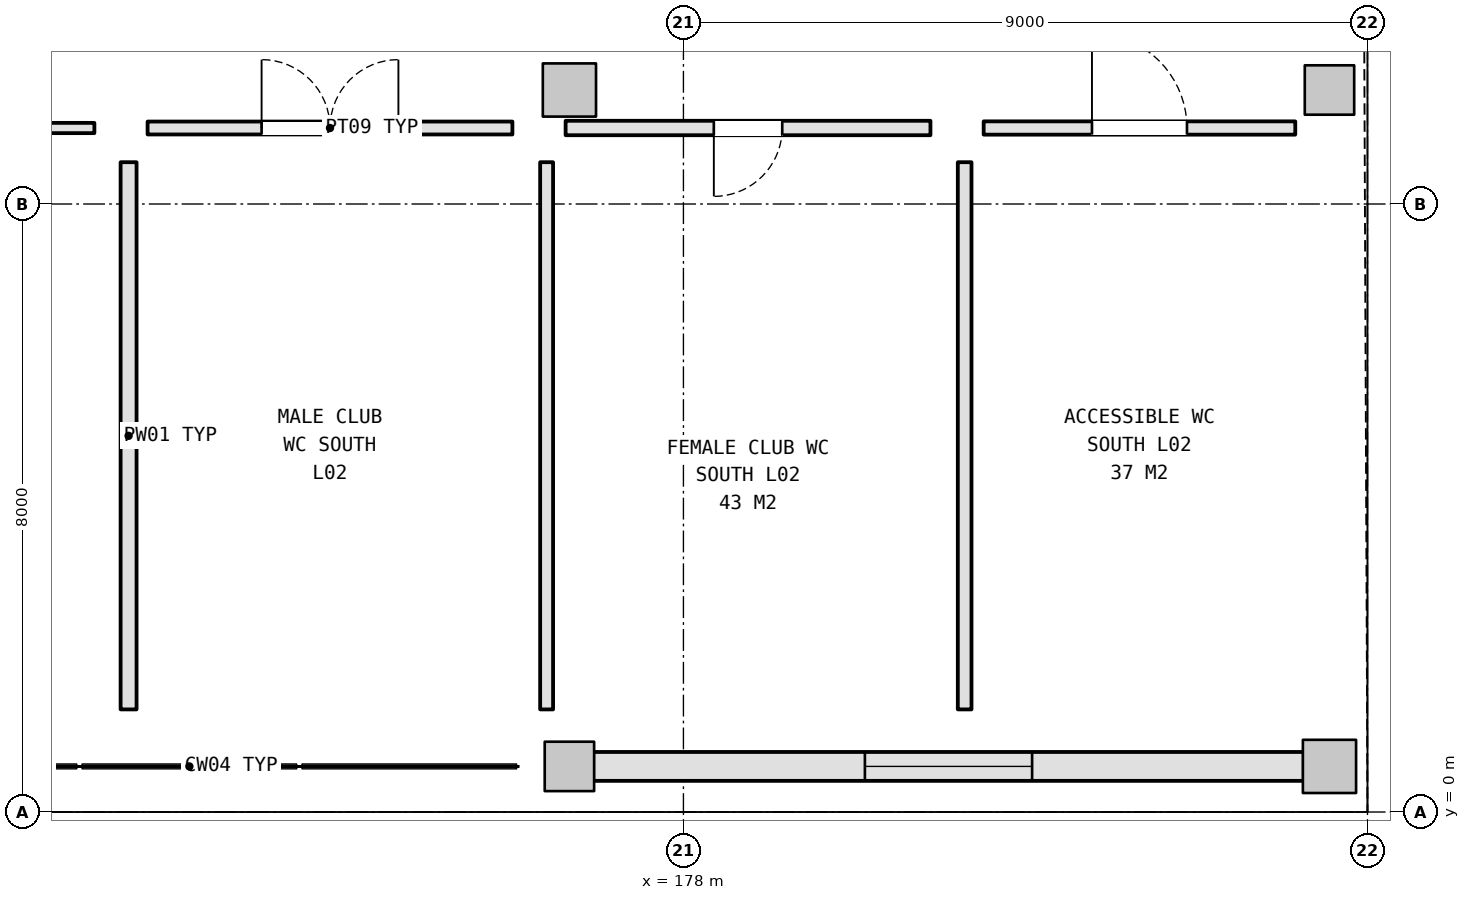
"""IFC4 building model, lengths in metres.
Left out: names, types, materials, properties, quantities, classifications, styles, units other than length and angle.
Written with IfcOpenShell. Run it as: python <this file> out.ifc"""

import sys

from ifc_helpers import new_model, si_unit, direction, frame, frame_2d, origin, origin_2d, place, context, subcontext, project, spatial, rectangle, extrude, element, fill, save


model = new_model("IFC4")
c1 = context("Model", 3, precision=1e-05, world=origin(), true_north=direction((0.0, 1.0)))
c2 = subcontext(c1, "Body", "Model", "MODEL_VIEW")
j1 = project(units=[si_unit("LENGTHUNIT", "METRE"), si_unit("PLANEANGLEUNIT", "RADIAN")], contexts=[c1])
p1 = place(None, origin())
s1 = spatial("IfcSite", under=j1, at=p1, CompositionType="ELEMENT")
p2 = place(p1, origin())
s2 = spatial("IfcBuilding", under=s1, at=p2, CompositionType="ELEMENT")
p3 = place(p2, frame((0.0, 0.0, 10.8)))
s3 = spatial("IfcBuildingStorey", under=s2, at=p3, CompositionType="ELEMENT", Elevation=10.8)
p4 = place(p3, frame((176.5, 0.6, 0.0), z_axis=(0.0, 0.0, 1.0), x_axis=(1.0, 0.0, 0.0)))
e1 = element("IfcColumn", 1, at=p4, inside=s3, PredefinedType="COLUMN", context=c2, shape_type="SweptSolid", body=[
    extrude(rectangle(XDim=0.65, YDim=0.65, at=origin_2d()), origin(), (0.0, 0.0, 1.0), 5.4),
])
for number, where, z_axis, x_axis in (
    (2, (176.5, 9.5, 0.0), (0.0, 0.0, 1.0), (1.0, 0.0, 0.0)),
    (3, (186.5, 0.6, 0.0), (0.0, 0.0, 1.0), (1.0, 0.0, 0.0)),
):
    element("IfcColumn", number, at=place(p3, frame(where, z_axis=z_axis, x_axis=x_axis)), inside=s3, PredefinedType="COLUMN", context=c2, shape_type="SweptSolid", body=[
        extrude(rectangle(XDim=0.7, YDim=0.7, at=origin_2d()), origin(), (0.0, 0.0, 1.0), 5.4),
    ])
p5 = place(p3, frame((186.5, 9.5, 0.0), z_axis=(0.0, 0.0, 1.0), x_axis=(1.0, 0.0, 0.0)))
e4 = element("IfcColumn", 4, at=p5, inside=s3, PredefinedType="COLUMN", context=c2, shape_type="SweptSolid", body=[
    extrude(rectangle(XDim=0.65, YDim=0.65, at=origin_2d()), origin(), (0.0, 0.0, 1.0), 5.4),
])
p6 = place(p3, frame((176.813, 0.6, 0.0), z_axis=(0.0, 0.0, 1.0), x_axis=(1.0, 0.0, 0.0)))
e5 = element("IfcWall", 5, at=p6, inside=s3, PredefinedType="SOLIDWALL", context=c2, shape_type="SweptSolid", body=[
    extrude(rectangle(XDim=9.349, YDim=0.38, at=frame_2d((4.675, 0.0))), origin(), (0.0, 0.0, 1.0), 4.435),
])
p7 = place(p6, frame((3.574, 0.0, 1.05)))
e6 = element("IfcOpeningElement", 6, at=p7, cuts=e5, PredefinedType="OPENING", context=c2, shape_type="SweptSolid", body=[
    extrude(rectangle(XDim=2.2, YDim=1.8, at=frame_2d((1.1, 0.9))), frame((0.0, 0.2, 0.0), z_axis=(0.0, -1.0, 0.0), x_axis=(1.0, 0.0, 0.0)), (0.0, 0.0, 1.0), 0.4),
])
p8 = place(p3, frame((156.95, 9.0, 0.0), z_axis=(0.0, 0.0, 1.0), x_axis=(1.0, 0.0, 0.0)))
e7 = element("IfcWall", 7, at=p8, inside=s3, PredefinedType="PARTITIONING", context=c2, shape_type="SweptSolid", body=[
    extrude(rectangle(XDim=13.3, YDim=0.135, at=frame_2d((6.65, 0.0))), origin(), (0.0, 0.0, 1.0), 4.435),
])
p9 = place(p8, frame((6.0, 0.0, 0.0)))
e8 = element("IfcOpeningElement", 8, at=p9, cuts=e7, PredefinedType="OPENING", context=c2, shape_type="SweptSolid", body=[
    extrude(rectangle(XDim=1.3, YDim=2.2, at=frame_2d((0.65, 1.1))), frame((0.0, 0.077, 0.0), z_axis=(0.0, -1.0, 0.0), x_axis=(1.0, 0.0, 0.0)), (0.0, 0.0, 1.0), 0.155),
])
p10 = place(p3, frame((170.95, 9.0, 0.0), z_axis=(0.0, 0.0, 1.0), x_axis=(1.0, 0.0, 0.0)))
e9 = element("IfcWall", 9, at=p10, inside=s3, PredefinedType="PARTITIONING", context=c2, shape_type="SweptSolid", body=[
    extrude(rectangle(XDim=4.8, YDim=0.17, at=frame_2d((2.4, 0.0))), origin(), (0.0, 0.0, 1.0), 5.12),
])
p11 = place(p10, frame((1.5, 0.0, 0.0)))
e10 = element("IfcOpeningElement", 10, at=p11, cuts=e9, PredefinedType="OPENING", context=c2, shape_type="SweptSolid", body=[
    extrude(rectangle(XDim=1.8, YDim=2.2, at=frame_2d((0.9, 1.1))), frame((0.0, 0.095, 0.0), z_axis=(0.0, -1.0, 0.0), x_axis=(1.0, 0.0, 0.0)), (0.0, 0.0, 1.0), 0.19),
])
p12 = place(p3, frame((170.7, 1.35, 0.0), z_axis=(0.0, 0.0, 1.0), x_axis=(0.0, 1.0, 0.0)))
e11 = element("IfcWall", 11, at=p12, inside=s3, PredefinedType="PLUMBINGWALL", context=c2, shape_type="SweptSolid", body=[
    extrude(rectangle(XDim=7.2, YDim=0.21, at=frame_2d((3.6, 0.0))), origin(), (0.0, 0.0, 1.0), 4.635),
])
p13 = place(p3, frame((176.45, 9.0, 0.0), z_axis=(0.0, 0.0, 1.0), x_axis=(1.0, 0.0, 0.0)))
e12 = element("IfcWall", 12, at=p13, inside=s3, PredefinedType="PARTITIONING", context=c2, shape_type="SweptSolid", body=[
    extrude(rectangle(XDim=4.8, YDim=0.19, at=frame_2d((2.4, 0.0))), origin(), (0.0, 0.0, 1.0), 4.435),
])
p14 = place(p13, frame((1.95, 0.0, 0.0)))
e13 = element("IfcOpeningElement", 13, at=p14, cuts=e12, PredefinedType="OPENING", context=c2, shape_type="SweptSolid", body=[
    extrude(rectangle(XDim=0.9, YDim=2.1, at=frame_2d((0.45, 1.05))), frame((0.0, 0.105, 0.0), z_axis=(0.0, -1.0, 0.0), x_axis=(1.0, 0.0, 0.0)), (0.0, 0.0, 1.0), 0.21),
])
p15 = place(p3, frame((176.2, 1.35, 0.0), z_axis=(0.0, 0.0, 1.0), x_axis=(0.0, 1.0, 0.0)))
e14 = element("IfcWall", 14, at=p15, inside=s3, PredefinedType="PARTITIONING", context=c2, shape_type="SweptSolid", body=[
    extrude(rectangle(XDim=7.2, YDim=0.17, at=frame_2d((3.6, 0.0))), origin(), (0.0, 0.0, 1.0), 4.435),
])
p16 = place(p3, frame((181.95, 9.0, 0.0), z_axis=(0.0, 0.0, 1.0), x_axis=(1.0, 0.0, 0.0)))
e15 = element("IfcWall", 15, at=p16, inside=s3, PredefinedType="PARTITIONING", context=c2, shape_type="SweptSolid", body=[
    extrude(rectangle(XDim=4.1, YDim=0.175, at=frame_2d((2.05, 0.0))), origin(), (0.0, 0.0, 1.0), 5.12),
])
p17 = place(p16, frame((1.425, 0.0, 0.0)))
e16 = element("IfcOpeningElement", 16, at=p17, cuts=e15, PredefinedType="OPENING", context=c2, shape_type="SweptSolid", body=[
    extrude(rectangle(XDim=1.25, YDim=2.2, at=frame_2d((0.625, 1.1))), frame((0.0, 0.097, 0.0), z_axis=(0.0, -1.0, 0.0), x_axis=(1.0, 0.0, 0.0)), (0.0, 0.0, 1.0), 0.195),
])
p18 = place(p3, frame((181.7, 1.35, 0.0), z_axis=(0.0, 0.0, 1.0), x_axis=(0.0, 1.0, 0.0)))
e17 = element("IfcWall", 17, at=p18, inside=s3, PredefinedType="PARTITIONING", context=c2, shape_type="SweptSolid", body=[
    extrude(rectangle(XDim=7.2, YDim=0.18, at=frame_2d((3.6, 0.0))), origin(), (0.0, 0.0, 1.0), 4.635),
])
p19 = place(p7, origin())
e18 = element("IfcWindow", 18, at=p19, inside=s3, PartitioningType="SINGLE_PANEL", PredefinedType="WINDOW", context=c2, shape_type="SweptSolid", body=[
    extrude(rectangle(XDim=2.2, YDim=1.8, at=frame_2d((1.1, 0.9))), frame((0.0, 0.03, 0.0), z_axis=(0.0, -1.0, 0.0), x_axis=(1.0, 0.0, 0.0)), (0.0, 0.0, 1.0), 0.06),
])
fill(e6, e18)
p20 = place(p11, origin())
e19 = element("IfcDoor", 19, at=p20, inside=s3, OperationType="DOUBLE_DOOR_SINGLE_SWING", PredefinedType="DOOR", context=c2, shape_type="SweptSolid", body=[
    extrude(rectangle(XDim=1.8, YDim=2.2, at=frame_2d((0.9, 1.1))), frame((0.0, 0.025, 0.0), z_axis=(0.0, -1.0, 0.0), x_axis=(1.0, 0.0, 0.0)), (0.0, 0.0, 1.0), 0.05),
])
fill(e10, e19)
p21 = place(p14, frame((0.9, 0.0, 0.0), z_axis=(0.0, 0.0, 1.0), x_axis=(-1.0, 0.0, 0.0)))
e20 = element("IfcDoor", 20, at=p21, inside=s3, OperationType="SINGLE_SWING_LEFT", PredefinedType="DOOR", context=c2, shape_type="SweptSolid", body=[
    extrude(rectangle(XDim=0.9, YDim=2.1, at=frame_2d((0.45, 1.05))), frame((0.0, 0.025, 0.0), z_axis=(0.0, -1.0, 0.0), x_axis=(1.0, 0.0, 0.0)), (0.0, 0.0, 1.0), 0.05),
])
fill(e13, e20)
p22 = place(p17, origin())
e21 = element("IfcDoor", 21, at=p22, inside=s3, OperationType="SINGLE_SWING_LEFT", PredefinedType="DOOR", context=c2, shape_type="SweptSolid", body=[
    extrude(rectangle(XDim=1.25, YDim=2.2, at=frame_2d((0.625, 1.1))), frame((0.0, 0.025, 0.0), z_axis=(0.0, -1.0, 0.0), x_axis=(1.0, 0.0, 0.0)), (0.0, 0.0, 1.0), 0.05),
])
fill(e16, e21)
save(model, sys.argv[1])
